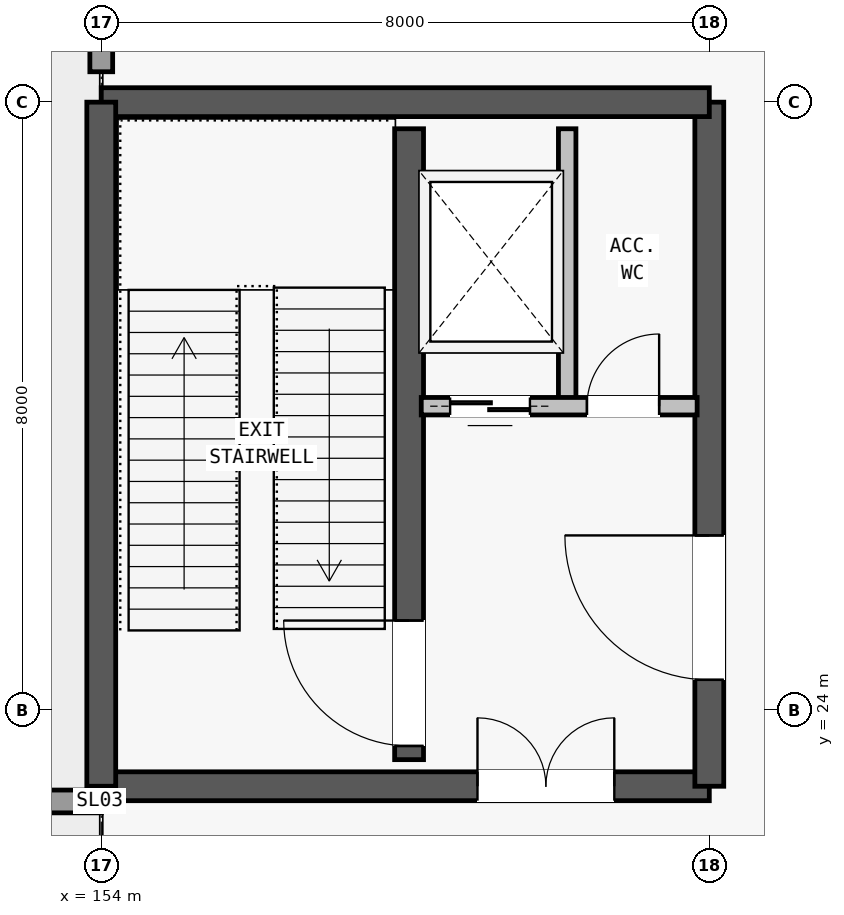
"""IFC4 building model, lengths in metres.
Left out: names, types, materials, properties, quantities, classifications, styles, units other than length and angle.
Written with IfcOpenShell. Run it as: python <this file> out.ifc"""

import sys

from ifc_helpers import new_model, si_unit, direction, frame, frame_2d, origin, place, context, subcontext, project, spatial, rectangle, extrude, element, fill, save


model = new_model("IFC4")
c1 = context("Model", 3, precision=1e-05, world=origin(), true_north=direction((0.0, 1.0)))
c2 = subcontext(c1, "Body", "Model", "MODEL_VIEW")
j1 = project(units=[si_unit("LENGTHUNIT", "METRE"), si_unit("PLANEANGLEUNIT", "RADIAN")], contexts=[c1])
p1 = place(None, origin())
s1 = spatial("IfcSite", under=j1, at=p1, CompositionType="ELEMENT")
p2 = place(p1, origin())
s2 = spatial("IfcBuilding", under=s1, at=p2, CompositionType="ELEMENT")
p3 = place(p2, origin())
s3 = spatial("IfcBuildingStorey", under=s2, at=p3, CompositionType="ELEMENT", Elevation=0.0)
p4 = place(p3, frame((52.0, 22.8, -0.9), z_axis=(0.0, 0.0, 1.0), x_axis=(1.0, 0.0, 0.0)))
e1 = element("IfcWall", 1, at=p4, inside=s3, PredefinedType="STANDARD", context=c2, shape_type="SweptSolid", body=[
    extrude(rectangle(XDim=102.0, YDim=0.3, at=frame_2d((51.0, 0.0))), origin(), (0.0, 0.0, 1.0), 0.9),
])
p5 = place(p3, frame((154.0, 32.4, -0.9), z_axis=(0.0, 0.0, 1.0), x_axis=(0.0, 1.0, 0.0)))
e2 = element("IfcWall", 2, at=p5, inside=s3, PredefinedType="STANDARD", context=c2, shape_type="SweptSolid", body=[
    extrude(rectangle(XDim=7.6, YDim=0.3, at=frame_2d((3.8, 0.0))), origin(), (0.0, 0.0, 1.0), 0.9),
])
p6 = place(p3, frame((154.0, 23.0, -0.9), z_axis=(0.0, 0.0, 1.0), x_axis=(1.0, 0.0, 0.0)))
e3 = element("IfcWall", 3, at=p6, inside=s3, PredefinedType="SHEAR", context=c2, shape_type="SweptSolid", body=[
    extrude(rectangle(XDim=8.0, YDim=0.38, at=frame_2d((4.0, 0.0))), origin(), (0.0, 0.0, 1.0), 6.22),
])
p7 = place(p6, frame((4.95, 0.0, 0.9)))
e4 = element("IfcOpeningElement", 4, at=p7, cuts=e3, PredefinedType="OPENING", context=c2, shape_type="SweptSolid", body=[
    extrude(rectangle(XDim=1.8, YDim=2.25, at=frame_2d((0.9, 1.125))), frame((0.0, 0.2, 0.0), z_axis=(0.0, -1.0, 0.0), x_axis=(1.0, 0.0, 0.0)), (0.0, 0.0, 1.0), 0.4),
])
p8 = place(p3, frame((162.0, 23.0, -0.9), z_axis=(0.0, 0.0, 1.0), x_axis=(0.0, 1.0, 0.0)))
e5 = element("IfcWall", 5, at=p8, inside=s3, PredefinedType="SHEAR", context=c2, shape_type="SweptSolid", body=[
    extrude(rectangle(XDim=9.0, YDim=0.38, at=frame_2d((4.5, 0.0))), origin(), (0.0, 0.0, 1.0), 6.22),
])
p9 = place(p8, frame((1.4, 0.0, 0.9)))
e6 = element("IfcOpeningElement", 6, at=p9, cuts=e5, PredefinedType="OPENING", context=c2, shape_type="SweptSolid", body=[
    extrude(rectangle(XDim=1.9, YDim=2.3, at=frame_2d((0.95, 1.15))), frame((0.0, 0.2, 0.0), z_axis=(0.0, -1.0, 0.0), x_axis=(1.0, 0.0, 0.0)), (0.0, 0.0, 1.0), 0.4),
])
p10 = place(p3, frame((162.0, 32.0, -0.9), z_axis=(0.0, 0.0, 1.0), x_axis=(-1.0, 0.0, 0.0)))
e7 = element("IfcWall", 7, at=p10, inside=s3, PredefinedType="SHEAR", context=c2, shape_type="SweptSolid", body=[
    extrude(rectangle(XDim=8.0, YDim=0.38, at=frame_2d((4.0, 0.0))), origin(), (0.0, 0.0, 1.0), 6.22),
])
p11 = place(p3, frame((154.0, 32.0, -0.9), z_axis=(0.0, 0.0, 1.0), x_axis=(0.0, -1.0, 0.0)))
e8 = element("IfcWall", 8, at=p11, inside=s3, PredefinedType="SHEAR", context=c2, shape_type="SweptSolid", body=[
    extrude(rectangle(XDim=9.0, YDim=0.38, at=frame_2d((4.5, 0.0))), origin(), (0.0, 0.0, 1.0), 6.22),
])
p12 = place(p3, frame((158.05, 23.35, -0.9), z_axis=(0.0, 0.0, 1.0), x_axis=(0.0, 1.0, 0.0)))
e9 = element("IfcWall", 9, at=p12, inside=s3, PredefinedType="SHEAR", context=c2, shape_type="SweptSolid", body=[
    extrude(rectangle(XDim=8.3, YDim=0.38, at=frame_2d((4.15, 0.0))), origin(), (0.0, 0.0, 1.0), 6.22),
])
p13 = place(p12, frame((0.18, 0.0, 0.9)))
e10 = element("IfcOpeningElement", 10, at=p13, cuts=e9, PredefinedType="OPENING", context=c2, shape_type="SweptSolid", body=[
    extrude(rectangle(XDim=1.65, YDim=2.2, at=frame_2d((0.825, 1.1))), frame((0.0, 0.2, 0.0), z_axis=(0.0, -1.0, 0.0), x_axis=(1.0, 0.0, 0.0)), (0.0, 0.0, 1.0), 0.4),
])
p14 = place(p3, frame((160.13, 28.0, 0.0), z_axis=(0.0, 0.0, 1.0), x_axis=(0.0, 1.0, 0.0)))
e11 = element("IfcWall", 11, at=p14, inside=s3, PredefinedType="PARTITIONING", context=c2, shape_type="SweptSolid", body=[
    extrude(rectangle(XDim=3.65, YDim=0.23, at=frame_2d((1.825, 0.0))), origin(), (0.0, 0.0, 1.0), 4.2),
])
p15 = place(p3, frame((158.21, 28.0, 0.0), z_axis=(0.0, 0.0, 1.0), x_axis=(1.0, 0.0, 0.0)))
e12 = element("IfcWall", 12, at=p15, inside=s3, PredefinedType="PARTITIONING", context=c2, shape_type="SweptSolid", body=[
    extrude(rectangle(XDim=3.63, YDim=0.23, at=frame_2d((1.815, 0.0))), origin(), (0.0, 0.0, 1.0), 4.2),
])
p16 = place(p15, frame((0.38, 0.0, 0.0)))
e13 = element("IfcOpeningElement", 13, at=p16, cuts=e12, PredefinedType="OPENING", context=c2, shape_type="SweptSolid", body=[
    extrude(rectangle(XDim=1.05, YDim=2.15, at=frame_2d((0.525, 1.075))), frame((0.0, 0.125, 0.0), z_axis=(0.0, -1.0, 0.0), x_axis=(1.0, 0.0, 0.0)), (0.0, 0.0, 1.0), 0.25),
])
p17 = place(p15, frame((2.18, 0.0, 0.0)))
e14 = element("IfcOpeningElement", 14, at=p17, cuts=e12, PredefinedType="OPENING", context=c2, shape_type="SweptSolid", body=[
    extrude(rectangle(XDim=0.95, YDim=2.1, at=frame_2d((0.475, 1.05))), frame((0.0, 0.125, 0.0), z_axis=(0.0, -1.0, 0.0), x_axis=(1.0, 0.0, 0.0)), (0.0, 0.0, 1.0), 0.25),
])
p18 = place(p7, origin())
e15 = element("IfcDoor", 15, at=p18, inside=s3, OperationType="DOUBLE_SWING_LEFT", PredefinedType="DOOR", context=c2, shape_type="SweptSolid", body=[
    extrude(rectangle(XDim=1.8, YDim=2.25, at=frame_2d((0.9, 1.125))), frame((0.0, 0.025, 0.0), z_axis=(0.0, -1.0, 0.0), x_axis=(1.0, 0.0, 0.0)), (0.0, 0.0, 1.0), 0.05),
])
fill(e4, e15)
p19 = place(p9, origin())
e16 = element("IfcDoor", 16, at=p19, inside=s3, OperationType="SINGLE_SWING_RIGHT", PredefinedType="DOOR", context=c2, shape_type="SweptSolid", body=[
    extrude(rectangle(XDim=1.9, YDim=2.3, at=frame_2d((0.95, 1.15))), frame((0.0, 0.025, 0.0), z_axis=(0.0, -1.0, 0.0), x_axis=(1.0, 0.0, 0.0)), (0.0, 0.0, 1.0), 0.05),
])
fill(e6, e16)
p20 = place(p13, origin())
e17 = element("IfcDoor", 17, at=p20, inside=s3, OperationType="SINGLE_SWING_RIGHT", PredefinedType="DOOR", context=c2, shape_type="SweptSolid", body=[
    extrude(rectangle(XDim=1.65, YDim=2.2, at=frame_2d((0.825, 1.1))), frame((0.0, 0.025, 0.0), z_axis=(0.0, -1.0, 0.0), x_axis=(1.0, 0.0, 0.0)), (0.0, 0.0, 1.0), 0.05),
])
fill(e10, e17)
p21 = place(p16, origin())
e18 = element("IfcDoor", 18, at=p21, inside=s3, OperationType="SLIDING_TO_LEFT", PredefinedType="DOOR", context=c2, shape_type="SweptSolid", body=[
    extrude(rectangle(XDim=1.05, YDim=2.15, at=frame_2d((0.525, 1.075))), frame((0.0, 0.025, 0.0), z_axis=(0.0, -1.0, 0.0), x_axis=(1.0, 0.0, 0.0)), (0.0, 0.0, 1.0), 0.05),
])
fill(e13, e18)
p22 = place(p17, origin())
e19 = element("IfcDoor", 19, at=p22, inside=s3, OperationType="SINGLE_SWING_RIGHT", PredefinedType="DOOR", context=c2, shape_type="SweptSolid", body=[
    extrude(rectangle(XDim=0.95, YDim=2.1, at=frame_2d((0.475, 1.05))), frame((0.0, 0.025, 0.0), z_axis=(0.0, -1.0, 0.0), x_axis=(1.0, 0.0, 0.0)), (0.0, 0.0, 1.0), 0.05),
])
fill(e14, e19)
save(model, sys.argv[1])
